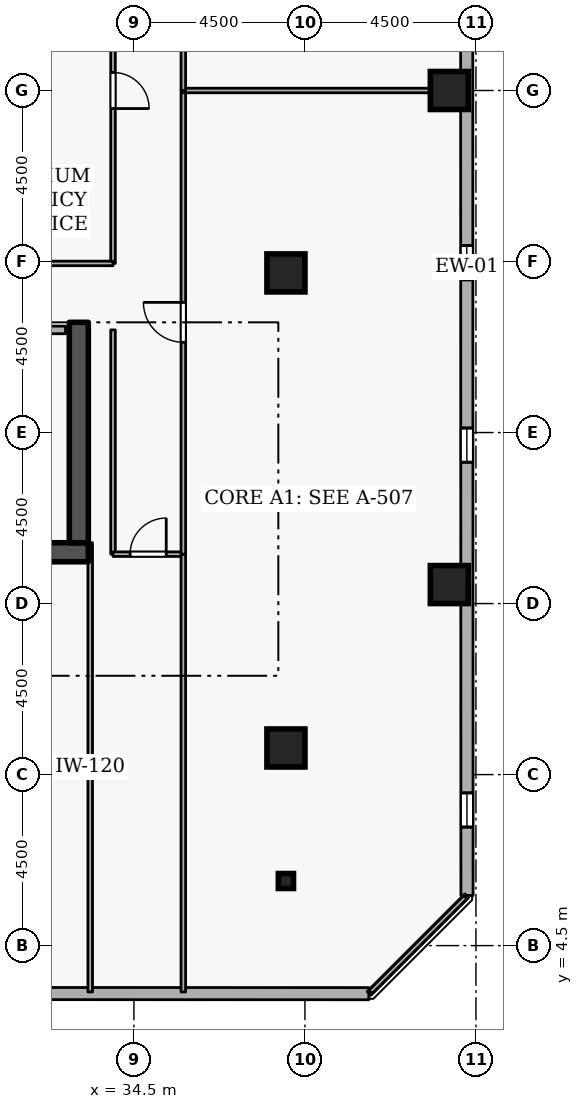
"""IFC4 building model, lengths in metres.
Left out: names, types, materials, properties, quantities, classifications, styles, units other than length and angle.
Written with IfcOpenShell. Run it as: python <this file> out.ifc"""

import sys

from ifc_helpers import new_model, si_unit, direction, frame, frame_2d, origin, origin_2d, place, context, subcontext, project, spatial, rectangle, i_section, extrude, element, fill, save


model = new_model("IFC4")
c1 = context("Model", 3, precision=1e-05, world=origin(), true_north=direction((0.0, 1.0)))
c2 = subcontext(c1, "Body", "Model", "MODEL_VIEW")
j1 = project(units=[si_unit("LENGTHUNIT", "METRE"), si_unit("PLANEANGLEUNIT", "RADIAN")], contexts=[c1])
p1 = place(None, origin())
s1 = spatial("IfcSite", under=j1, at=p1, CompositionType="ELEMENT")
p2 = place(p1, origin())
s2 = spatial("IfcBuilding", under=s1, at=p2, CompositionType="ELEMENT")
p3 = place(p2, frame((0.0, 0.0, 233.1)))
s3 = spatial("IfcBuildingStorey", under=s2, at=p3, CompositionType="ELEMENT", Elevation=233.1)
p4 = place(p3, frame((17.7, 14.85, 0.0), z_axis=(0.0, 0.0, 1.0), x_axis=(1.0, 0.0, 0.0)))
e1 = element("IfcWall", 1, at=p4, inside=s3, PredefinedType="SHEAR", context=c2, shape_type="SweptSolid", body=[
    extrude(rectangle(XDim=15.6, YDim=0.5, at=frame_2d((7.8, 0.0))), origin(), (0.0, 0.0, 1.0), 3.6),
])
p5 = place(p3, frame((33.05, 15.1, 0.0), z_axis=(0.0, 0.0, 1.0), x_axis=(0.0, 1.0, 0.0)))
e2 = element("IfcWall", 2, at=p5, inside=s3, PredefinedType="SHEAR", context=c2, shape_type="SweptSolid", body=[
    extrude(rectangle(XDim=5.8, YDim=0.5, at=frame_2d((2.9, 0.0))), origin(), (0.0, 0.0, 1.0), 3.6),
])
for number, where, z_axis, x_axis in (
    (3, (38.5, 9.7, 0.0), (0.0, 0.0, 1.0), (1.0, 0.0, 0.0)),
    (4, (42.8, 14.0, 0.0), (0.0, 0.0, 1.0), (1.0, 0.0, 0.0)),
    (5, (42.8, 27.0, 0.0), (0.0, 0.0, 1.0), (1.0, 0.0, 0.0)),
    (6, (38.5, 22.2, 0.0), (0.0, 0.0, 1.0), (1.0, 0.0, 0.0)),
):
    element("IfcColumn", number, at=place(p3, frame(where, z_axis=z_axis, x_axis=x_axis)), inside=s3, PredefinedType="COLUMN", context=c2, shape_type="SweptSolid", body=[
        extrude(rectangle(XDim=1.0, YDim=1.0, at=origin_2d()), origin(), (0.0, 0.0, 1.0), 3.6),
    ])
p6 = place(p3, frame((38.5, 6.2, 0.0), z_axis=(0.0, 0.0, 1.0), x_axis=(1.0, 0.0, 0.0)))
e7 = element("IfcColumn", 7, at=p6, inside=s3, PredefinedType="COLUMN", context=c2, shape_type="SweptSolid", body=[
    extrude(i_section(OverallWidth=0.399, OverallDepth=0.394, WebThickness=0.023, FlangeThickness=0.037, FilletRadius=0.015, at=origin_2d()), origin(), (0.0, 0.0, 1.0), 3.6),
])
p7 = place(p3, frame((7.628, 3.246, 0.0), z_axis=(0.0, 0.0, 1.0), x_axis=(0.999999944762, -0.000332378036, 0.0)))
e8 = element("IfcWall", 8, at=p7, inside=s3, PredefinedType="STANDARD", context=c2, shape_type="SweptSolid", body=[
    extrude(rectangle(XDim=33.054, YDim=0.32, at=frame_2d((16.527, 0.0))), origin(), (0.0, 0.0, 1.0), 2.7),
])
p8 = place(p7, frame((1.8, 0.0, 0.72)))
e9 = element("IfcOpeningElement", 9, at=p8, cuts=e8, PredefinedType="OPENING", context=c2, shape_type="SweptSolid", body=[
    extrude(rectangle(XDim=0.9, YDim=1.75, at=frame_2d((0.45, 0.875))), frame((0.0, 0.17, 0.0), z_axis=(0.0, -1.0, 0.0), x_axis=(1.0, 0.0, 0.0)), (0.0, 0.0, 1.0), 0.34),
])
p9 = place(p7, frame((11.4, 0.0, 0.72)))
e10 = element("IfcOpeningElement", 10, at=p9, cuts=e8, PredefinedType="OPENING", context=c2, shape_type="SweptSolid", body=[
    extrude(rectangle(XDim=0.9, YDim=1.75, at=frame_2d((0.45, 0.875))), frame((0.0, 0.17, 0.0), z_axis=(0.0, -1.0, 0.0), x_axis=(1.0, 0.0, 0.0)), (0.0, 0.0, 1.0), 0.34),
])
p10 = place(p7, frame((16.2, 0.0, 0.72)))
e11 = element("IfcOpeningElement", 11, at=p10, cuts=e8, PredefinedType="OPENING", context=c2, shape_type="SweptSolid", body=[
    extrude(rectangle(XDim=0.9, YDim=1.75, at=frame_2d((0.45, 0.875))), frame((0.0, 0.17, 0.0), z_axis=(0.0, -1.0, 0.0), x_axis=(1.0, 0.0, 0.0)), (0.0, 0.0, 1.0), 0.34),
])
p11 = place(p7, frame((21.0, 0.0, 0.72)))
e12 = element("IfcOpeningElement", 12, at=p11, cuts=e8, PredefinedType="OPENING", context=c2, shape_type="SweptSolid", body=[
    extrude(rectangle(XDim=0.9, YDim=1.75, at=frame_2d((0.45, 0.875))), frame((0.0, 0.17, 0.0), z_axis=(0.0, -1.0, 0.0), x_axis=(1.0, 0.0, 0.0)), (0.0, 0.0, 1.0), 0.34),
])
p12 = place(p3, frame((43.265, 5.819, 0.0), z_axis=(0.0, 0.0, 1.0), x_axis=(-0.000332378036, 0.999999944762, 0.0)))
e13 = element("IfcWall", 13, at=p12, inside=s3, PredefinedType="STANDARD", context=c2, shape_type="SweptSolid", body=[
    extrude(rectangle(XDim=33.054, YDim=0.32, at=frame_2d((16.527, 0.0))), origin(), (0.0, 0.0, 1.0), 2.7),
])
p13 = place(p12, frame((1.8, 0.0, 0.72)))
e14 = element("IfcOpeningElement", 14, at=p13, cuts=e13, PredefinedType="OPENING", context=c2, shape_type="SweptSolid", body=[
    extrude(rectangle(XDim=0.9, YDim=1.75, at=frame_2d((0.45, 0.875))), frame((0.0, 0.17, 0.0), z_axis=(0.0, -1.0, 0.0), x_axis=(1.0, 0.0, 0.0)), (0.0, 0.0, 1.0), 0.34),
])
p14 = place(p12, frame((11.4, 0.0, 0.72)))
e15 = element("IfcOpeningElement", 15, at=p14, cuts=e13, PredefinedType="OPENING", context=c2, shape_type="SweptSolid", body=[
    extrude(rectangle(XDim=0.9, YDim=1.75, at=frame_2d((0.45, 0.875))), frame((0.0, 0.17, 0.0), z_axis=(0.0, -1.0, 0.0), x_axis=(1.0, 0.0, 0.0)), (0.0, 0.0, 1.0), 0.34),
])
p15 = place(p12, frame((16.2, 0.0, 0.72)))
e16 = element("IfcOpeningElement", 16, at=p15, cuts=e13, PredefinedType="OPENING", context=c2, shape_type="SweptSolid", body=[
    extrude(rectangle(XDim=0.9, YDim=1.75, at=frame_2d((0.45, 0.875))), frame((0.0, 0.17, 0.0), z_axis=(0.0, -1.0, 0.0), x_axis=(1.0, 0.0, 0.0)), (0.0, 0.0, 1.0), 0.34),
])
p16 = place(p12, frame((25.8, 0.0, 0.72)))
e17 = element("IfcOpeningElement", 17, at=p16, cuts=e13, PredefinedType="OPENING", context=c2, shape_type="SweptSolid", body=[
    extrude(rectangle(XDim=0.9, YDim=1.75, at=frame_2d((0.45, 0.875))), frame((0.0, 0.17, 0.0), z_axis=(0.0, -1.0, 0.0), x_axis=(1.0, 0.0, 0.0)), (0.0, 0.0, 1.0), 0.34),
])
p17 = place(p3, frame((30.5, 20.7, 0.0), z_axis=(0.0, 0.0, 1.0), x_axis=(1.0, 0.0, 0.0)))
e18 = element("IfcWall", 18, at=p17, inside=s3, PredefinedType="STANDARD", context=c2, shape_type="SweptSolid", body=[
    extrude(rectangle(XDim=2.2, YDim=0.2, at=frame_2d((1.1, 0.0))), origin(), (0.0, 0.0, 1.0), 3.34),
])
p18 = place(p17, frame((0.525, 0.0, 0.0)))
e19 = element("IfcOpeningElement", 19, at=p18, cuts=e18, PredefinedType="OPENING", context=c2, shape_type="SweptSolid", body=[
    extrude(rectangle(XDim=1.15, YDim=2.1, at=frame_2d((0.575, 1.05))), frame((0.0, 0.11, 0.0), z_axis=(0.0, -1.0, 0.0), x_axis=(1.0, 0.0, 0.0)), (0.0, 0.0, 1.0), 0.22),
])
p19 = place(p3, frame((33.95, 20.7, 0.0), z_axis=(0.0, 0.0, 1.0), x_axis=(0.0, -1.0, 0.0)))
e20 = element("IfcWall", 20, at=p19, inside=s3, PredefinedType="PARTITIONING", context=c2, shape_type="SweptSolid", body=[
    extrude(rectangle(XDim=5.9, YDim=0.12, at=frame_2d((2.95, 0.0))), origin(), (0.0, 0.0, 1.0), 3.34),
])
p20 = place(p3, frame((33.95, 14.8, 0.0), z_axis=(0.0, 0.0, 1.0), x_axis=(1.0, 0.0, 0.0)))
e21 = element("IfcWall", 21, at=p20, inside=s3, PredefinedType="PARTITIONING", context=c2, shape_type="SweptSolid", body=[
    extrude(rectangle(XDim=1.85, YDim=0.12, at=frame_2d((0.925, 0.0))), origin(), (0.0, 0.0, 1.0), 3.34),
])
p21 = place(p20, frame((0.45, 0.0, 0.0)))
e22 = element("IfcOpeningElement", 22, at=p21, cuts=e21, PredefinedType="OPENING", context=c2, shape_type="SweptSolid", body=[
    extrude(rectangle(XDim=0.95, YDim=2.1, at=frame_2d((0.475, 1.05))), frame((0.0, 0.07, 0.0), z_axis=(0.0, -1.0, 0.0), x_axis=(1.0, 0.0, 0.0)), (0.0, 0.0, 1.0), 0.14),
])
p22 = place(p3, frame((35.8, 14.8, 0.0), z_axis=(0.0, 0.0, 1.0), x_axis=(0.0, -1.0, 0.0)))
e23 = element("IfcWall", 23, at=p22, inside=s3, PredefinedType="PARTITIONING", context=c2, shape_type="SweptSolid", body=[
    extrude(rectangle(XDim=11.52, YDim=0.12, at=frame_2d((5.76, 0.0))), origin(), (0.0, 0.0, 1.0), 3.34),
])
p23 = place(p3, frame((33.35, 3.28, 0.0), z_axis=(0.0, 0.0, 1.0), x_axis=(0.0, 1.0, 0.0)))
e24 = element("IfcWall", 24, at=p23, inside=s3, PredefinedType="PARTITIONING", context=c2, shape_type="SweptSolid", body=[
    extrude(rectangle(XDim=11.82, YDim=0.12, at=frame_2d((5.91, 0.0))), origin(), (0.0, 0.0, 1.0), 2.545),
])
p24 = place(p3, frame((35.8, 14.8, 0.0), z_axis=(0.0, 0.0, 1.0), x_axis=(0.0, 1.0, 0.0)))
e25 = element("IfcWall", 25, at=p24, inside=s3, PredefinedType="PARTITIONING", context=c2, shape_type="SweptSolid", body=[
    extrude(rectangle(XDim=12.2, YDim=0.12, at=frame_2d((6.1, 0.0))), origin(), (0.0, 0.0, 1.0), 3.34),
])
p25 = place(p24, frame((5.575, 0.0, 0.0)))
e26 = element("IfcOpeningElement", 26, at=p25, cuts=e25, PredefinedType="OPENING", context=c2, shape_type="SweptSolid", body=[
    extrude(rectangle(XDim=1.05, YDim=2.1, at=frame_2d((0.525, 1.05))), frame((0.0, 0.07, 0.0), z_axis=(0.0, -1.0, 0.0), x_axis=(1.0, 0.0, 0.0)), (0.0, 0.0, 1.0), 0.14),
])
p26 = place(p3, frame((35.8, 27.0, 0.0), z_axis=(0.0, 0.0, 1.0), x_axis=(1.0, 0.0, 0.0)))
e27 = element("IfcWall", 27, at=p26, inside=s3, PredefinedType="PARTITIONING", context=c2, shape_type="SweptSolid", body=[
    extrude(rectangle(XDim=7.42, YDim=0.12, at=frame_2d((3.71, 0.0))), origin(), (0.0, 0.0, 1.0), 2.932),
])
p27 = place(p3, frame((43.22, 5.775, 0.0), z_axis=(0.0, 0.0, 1.0), x_axis=(-0.707106781187, -0.707106781187, 0.0)))
e28 = element("IfcWall", 28, at=p27, inside=s3, PredefinedType="PARTITIONING", context=c2, shape_type="SweptSolid", body=[
    extrude(rectangle(XDim=3.528, YDim=0.12, at=frame_2d((1.764, 0.0))), origin(), (0.0, 0.0, 1.0), 3.34),
])
p28 = place(p3, frame((35.8, 27.0, 0.0), z_axis=(0.0, 0.0, 1.0), x_axis=(0.0, 1.0, 0.0)))
e29 = element("IfcWall", 29, at=p28, inside=s3, PredefinedType="PARTITIONING", context=c2, shape_type="SweptSolid", body=[
    extrude(rectangle(XDim=6.3, YDim=0.12, at=frame_2d((3.15, 0.0))), origin(), (0.0, 0.0, 1.0), 3.34),
])
p29 = place(p28, frame((2.625, 0.0, 0.0)))
e30 = element("IfcOpeningElement", 30, at=p29, cuts=e29, PredefinedType="OPENING", context=c2, shape_type="SweptSolid", body=[
    extrude(rectangle(XDim=1.05, YDim=2.1, at=frame_2d((0.525, 1.05))), frame((0.0, 0.07, 0.0), z_axis=(0.0, -1.0, 0.0), x_axis=(1.0, 0.0, 0.0)), (0.0, 0.0, 1.0), 0.14),
])
p30 = place(p3, frame((33.95, 31.55, 0.0), z_axis=(0.0, 0.0, 1.0), x_axis=(0.0, -1.0, 0.0)))
e31 = element("IfcWall", 31, at=p30, inside=s3, PredefinedType="PARTITIONING", context=c2, shape_type="SweptSolid", body=[
    extrude(rectangle(XDim=9.1, YDim=0.12, at=frame_2d((4.55, 0.0))), origin(), (0.0, 0.0, 1.0), 3.34),
])
p31 = place(p30, frame((4.075, 0.0, 0.0)))
e32 = element("IfcOpeningElement", 32, at=p31, cuts=e31, PredefinedType="OPENING", context=c2, shape_type="SweptSolid", body=[
    extrude(rectangle(XDim=0.95, YDim=2.1, at=frame_2d((0.475, 1.05))), frame((0.0, 0.07, 0.0), z_axis=(0.0, -1.0, 0.0), x_axis=(1.0, 0.0, 0.0)), (0.0, 0.0, 1.0), 0.14),
])
p32 = place(p3, frame((33.95, 22.45, 0.0), z_axis=(0.0, 0.0, 1.0), x_axis=(-1.0, 0.0, 0.0)))
e33 = element("IfcWall", 33, at=p32, inside=s3, PredefinedType="PARTITIONING", context=c2, shape_type="SweptSolid", body=[
    extrude(rectangle(XDim=3.25, YDim=0.12, at=frame_2d((1.625, 0.0))), origin(), (0.0, 0.0, 1.0), 3.34),
])
p33 = place(p13, origin())
e34 = element("IfcWindow", 34, at=p33, inside=s3, PartitioningType="SINGLE_PANEL", PredefinedType="WINDOW", context=c2, shape_type="SweptSolid", body=[
    extrude(rectangle(XDim=0.9, YDim=1.75, at=frame_2d((0.45, 0.875))), frame((0.0, 0.03, 0.0), z_axis=(0.0, -1.0, 0.0), x_axis=(1.0, 0.0, 0.0)), (0.0, 0.0, 1.0), 0.06),
])
fill(e14, e34)
p34 = place(p14, origin())
e35 = element("IfcWindow", 35, at=p34, inside=s3, PartitioningType="SINGLE_PANEL", PredefinedType="WINDOW", context=c2, shape_type="SweptSolid", body=[
    extrude(rectangle(XDim=0.9, YDim=1.75, at=frame_2d((0.45, 0.875))), frame((0.0, 0.03, 0.0), z_axis=(0.0, -1.0, 0.0), x_axis=(1.0, 0.0, 0.0)), (0.0, 0.0, 1.0), 0.06),
])
fill(e15, e35)
p35 = place(p15, origin())
e36 = element("IfcWindow", 36, at=p35, inside=s3, PartitioningType="SINGLE_PANEL", PredefinedType="WINDOW", context=c2, shape_type="SweptSolid", body=[
    extrude(rectangle(XDim=0.9, YDim=1.75, at=frame_2d((0.45, 0.875))), frame((0.0, 0.03, 0.0), z_axis=(0.0, -1.0, 0.0), x_axis=(1.0, 0.0, 0.0)), (0.0, 0.0, 1.0), 0.06),
])
fill(e16, e36)
p36 = place(p21, origin())
e37 = element("IfcDoor", 37, at=p36, inside=s3, OperationType="SINGLE_SWING_RIGHT", PredefinedType="DOOR", context=c2, shape_type="SweptSolid", body=[
    extrude(rectangle(XDim=0.95, YDim=2.1, at=frame_2d((0.475, 1.05))), frame((0.0, 0.025, 0.0), z_axis=(0.0, -1.0, 0.0), x_axis=(1.0, 0.0, 0.0)), (0.0, 0.0, 1.0), 0.05),
])
fill(e22, e37)
p37 = place(p25, origin())
e38 = element("IfcDoor", 38, at=p37, inside=s3, OperationType="SINGLE_SWING_RIGHT", PredefinedType="DOOR", context=c2, shape_type="SweptSolid", body=[
    extrude(rectangle(XDim=1.05, YDim=2.1, at=frame_2d((0.525, 1.05))), frame((0.0, 0.025, 0.0), z_axis=(0.0, -1.0, 0.0), x_axis=(1.0, 0.0, 0.0)), (0.0, 0.0, 1.0), 0.05),
])
fill(e26, e38)
p38 = place(p31, origin())
e39 = element("IfcDoor", 39, at=p38, inside=s3, OperationType="SINGLE_SWING_RIGHT", PredefinedType="DOOR", context=c2, shape_type="SweptSolid", body=[
    extrude(rectangle(XDim=0.95, YDim=2.1, at=frame_2d((0.475, 1.05))), frame((0.0, 0.025, 0.0), z_axis=(0.0, -1.0, 0.0), x_axis=(1.0, 0.0, 0.0)), (0.0, 0.0, 1.0), 0.05),
])
fill(e32, e39)
save(model, sys.argv[1])
